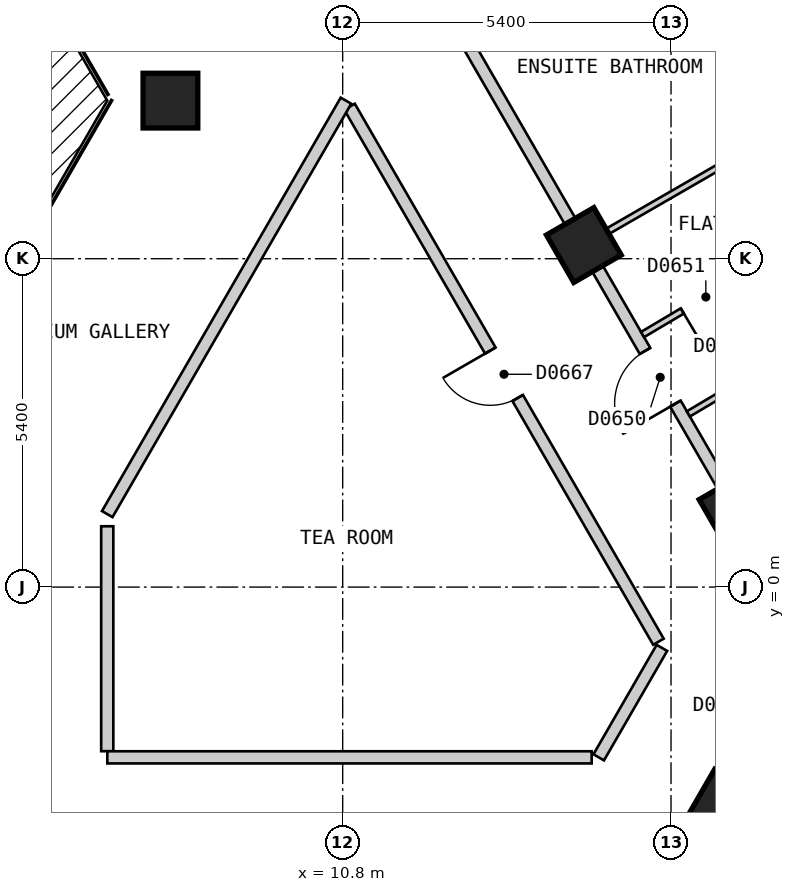
"""IFC4 building model, lengths in metres.
Left out: names, types, materials, properties, quantities, classifications, styles, units other than length and angle.
Written with IfcOpenShell. Run it as: python <this file> out.ifc"""

import sys

from ifc_helpers import new_model, si_unit, direction, frame, frame_2d, origin, origin_2d, place, context, subcontext, project, spatial, polyline, rectangle, outline, extrude, element, fill, save


model = new_model("IFC4")
c1 = context("Model", 3, precision=1e-05, world=origin(), true_north=direction((0.0, 1.0)))
c2 = subcontext(c1, "Body", "Model", "MODEL_VIEW")
j1 = project(units=[si_unit("LENGTHUNIT", "METRE"), si_unit("PLANEANGLEUNIT", "RADIAN")], contexts=[c1])
p1 = place(None, origin())
s1 = spatial("IfcSite", under=j1, at=p1, CompositionType="ELEMENT")
p2 = place(p1, origin())
s2 = spatial("IfcBuilding", under=s1, at=p2, CompositionType="ELEMENT")
p3 = place(p2, frame((0.0, 0.0, 75.0)))
s3 = spatial("IfcBuildingStorey", under=s2, at=p3, CompositionType="ELEMENT", Elevation=75.0)
for number, where, z_axis, x_axis in (
    (1, (17.083, -3.612, 0.0), (0.0, 0.0, 1.0), (0.5, 0.866, 0.0)),
    (2, (17.278, 1.274, 0.0), (0.0, 0.0, 1.0), (-0.5, 0.866, 0.0)),
    (3, (14.766, 5.625, 0.0), (0.0, 0.0, 1.0), (-0.5, 0.866, 0.0)),
    (4, (7.967, 8.0, 0.0), (0.0, 0.0, 1.0), (1.0, 0.0, 0.0)),
):
    element("IfcColumn", number, at=place(p3, frame(where, z_axis=z_axis, x_axis=x_axis)), inside=s3, PredefinedType="COLUMN", context=c2, shape_type="SweptSolid", body=[
        extrude(rectangle(XDim=0.9, YDim=0.9, at=origin_2d()), origin(), (0.0, 0.0, 1.0), 3.0),
    ])
p4 = place(p3, frame((29.027, 1.425, 0.0), z_axis=(0.0, 0.0, 1.0), x_axis=(-0.500027479704, 0.866009537788, 0.0)))
e5 = element("IfcWall", 5, at=p4, inside=s3, PredefinedType="SOLIDWALL", context=c2, shape_type="SweptSolid", body=[
    extrude(outline(polyline([(0.0, -0.15), (26.559, -0.15), (26.478, 0.15), (0.08, 0.15), (0.0, -0.15)])), origin(), (0.0, 0.0, 1.0), 2.7),
])
p5 = place(p4, frame((1.227, 0.0, 0.15)))
e6 = element("IfcOpeningElement", 6, at=p5, cuts=e5, PredefinedType="OPENING", context=c2, shape_type="SweptSolid", body=[
    extrude(rectangle(XDim=1.5, YDim=2.1, at=frame_2d((0.75, 1.05))), frame((0.0, 0.16, 0.0), z_axis=(0.0, -1.0, 0.0), x_axis=(1.0, 0.0, 0.0)), (0.0, 0.0, 1.0), 0.32),
])
p6 = place(p4, frame((3.738, 0.0, 0.15)))
e7 = element("IfcOpeningElement", 7, at=p6, cuts=e5, PredefinedType="OPENING", context=c2, shape_type="SweptSolid", body=[
    extrude(rectangle(XDim=1.5, YDim=2.1, at=frame_2d((0.75, 1.05))), frame((0.0, 0.16, 0.0), z_axis=(0.0, -1.0, 0.0), x_axis=(1.0, 0.0, 0.0)), (0.0, 0.0, 1.0), 0.32),
])
p7 = place(p4, frame((6.25, 0.0, 0.15)))
e8 = element("IfcOpeningElement", 8, at=p7, cuts=e5, PredefinedType="OPENING", context=c2, shape_type="SweptSolid", body=[
    extrude(rectangle(XDim=1.5, YDim=2.1, at=frame_2d((0.75, 1.05))), frame((0.0, 0.16, 0.0), z_axis=(0.0, -1.0, 0.0), x_axis=(1.0, 0.0, 0.0)), (0.0, 0.0, 1.0), 0.32),
])
p8 = place(p4, frame((8.761, 0.0, 0.15)))
e9 = element("IfcOpeningElement", 9, at=p8, cuts=e5, PredefinedType="OPENING", context=c2, shape_type="SweptSolid", body=[
    extrude(rectangle(XDim=1.5, YDim=2.1, at=frame_2d((0.75, 1.05))), frame((0.0, 0.16, 0.0), z_axis=(0.0, -1.0, 0.0), x_axis=(1.0, 0.0, 0.0)), (0.0, 0.0, 1.0), 0.32),
])
p9 = place(p4, frame((11.273, 0.0, 0.15)))
e10 = element("IfcOpeningElement", 10, at=p9, cuts=e5, PredefinedType="OPENING", context=c2, shape_type="SweptSolid", body=[
    extrude(rectangle(XDim=1.5, YDim=2.1, at=frame_2d((0.75, 1.05))), frame((0.0, 0.16, 0.0), z_axis=(0.0, -1.0, 0.0), x_axis=(1.0, 0.0, 0.0)), (0.0, 0.0, 1.0), 0.32),
])
p10 = place(p4, frame((13.785, 0.0, 0.15)))
e11 = element("IfcOpeningElement", 11, at=p10, cuts=e5, PredefinedType="OPENING", context=c2, shape_type="SweptSolid", body=[
    extrude(rectangle(XDim=1.5, YDim=2.1, at=frame_2d((0.75, 1.05))), frame((0.0, 0.16, 0.0), z_axis=(0.0, -1.0, 0.0), x_axis=(1.0, 0.0, 0.0)), (0.0, 0.0, 1.0), 0.32),
])
p11 = place(p4, frame((16.296, 0.0, 0.15)))
e12 = element("IfcOpeningElement", 12, at=p11, cuts=e5, PredefinedType="OPENING", context=c2, shape_type="SweptSolid", body=[
    extrude(rectangle(XDim=1.5, YDim=2.1, at=frame_2d((0.75, 1.05))), frame((0.0, 0.16, 0.0), z_axis=(0.0, -1.0, 0.0), x_axis=(1.0, 0.0, 0.0)), (0.0, 0.0, 1.0), 0.32),
])
p12 = place(p4, frame((18.807, 0.0, 0.15)))
e13 = element("IfcOpeningElement", 13, at=p12, cuts=e5, PredefinedType="OPENING", context=c2, shape_type="SweptSolid", body=[
    extrude(rectangle(XDim=1.5, YDim=2.1, at=frame_2d((0.75, 1.05))), frame((0.0, 0.16, 0.0), z_axis=(0.0, -1.0, 0.0), x_axis=(1.0, 0.0, 0.0)), (0.0, 0.0, 1.0), 0.32),
])
p13 = place(p4, frame((21.319, 0.0, 0.15)))
e14 = element("IfcOpeningElement", 14, at=p13, cuts=e5, PredefinedType="OPENING", context=c2, shape_type="SweptSolid", body=[
    extrude(rectangle(XDim=1.5, YDim=2.1, at=frame_2d((0.75, 1.05))), frame((0.0, 0.16, 0.0), z_axis=(0.0, -1.0, 0.0), x_axis=(1.0, 0.0, 0.0)), (0.0, 0.0, 1.0), 0.32),
])
p14 = place(p4, frame((23.831, 0.0, 0.15)))
e15 = element("IfcOpeningElement", 15, at=p14, cuts=e5, PredefinedType="OPENING", context=c2, shape_type="SweptSolid", body=[
    extrude(rectangle(XDim=1.5, YDim=2.1, at=frame_2d((0.75, 1.05))), frame((0.0, 0.16, 0.0), z_axis=(0.0, -1.0, 0.0), x_axis=(1.0, 0.0, 0.0)), (0.0, 0.0, 1.0), 0.32),
])
p15 = place(p3, frame((10.913, 7.899, 0.0), z_axis=(0.0, 0.0, 1.0), x_axis=(0.500028940566, -0.866008694296, 0.0)))
e16 = element("IfcWall", 16, at=p15, inside=s3, PredefinedType="PARTITIONING", context=c2, shape_type="SweptSolid", body=[
    extrude(rectangle(XDim=10.159, YDim=0.2, at=frame_2d((5.08, 0.0))), origin(), (0.0, 0.0, 1.0), 2.7),
])
p16 = place(p15, frame((4.63, 0.0, 0.0)))
e17 = element("IfcOpeningElement", 17, at=p16, cuts=e16, PredefinedType="OPENING", context=c2, shape_type="SweptSolid", body=[
    extrude(rectangle(XDim=0.9, YDim=2.1, at=frame_2d((0.45, 1.05))), frame((0.0, 0.11, 0.0), z_axis=(0.0, -1.0, 0.0), x_axis=(1.0, 0.0, 0.0)), (0.0, 0.0, 1.0), 0.22),
])
p17 = place(p3, frame((8.488, 16.5, 0.0), z_axis=(0.0, 0.0, 1.0), x_axis=(0.499986836607, -0.86603300354, 0.0)))
e18 = element("IfcWall", 18, at=p17, inside=s3, PredefinedType="PARTITIONING", context=c2, shape_type="SweptSolid", body=[
    extrude(rectangle(XDim=20.09, YDim=0.2, at=frame_2d((10.045, 0.0))), origin(), (0.0, 0.0, 1.0), 2.7),
])
p18 = place(p17, frame((14.569, 0.0, 0.0)))
e19 = element("IfcOpeningElement", 19, at=p18, cuts=e18, PredefinedType="OPENING", context=c2, shape_type="SweptSolid", body=[
    extrude(rectangle(XDim=1.0, YDim=2.1, at=frame_2d((0.5, 1.05))), frame((0.0, 0.11, 0.0), z_axis=(0.0, -1.0, 0.0), x_axis=(1.0, 0.0, 0.0)), (0.0, 0.0, 1.0), 0.22),
])
p19 = place(p3, frame((6.928, 1.0, 0.0), z_axis=(0.0, 0.0, 1.0), x_axis=(0.0, -1.0, 0.0)))
e20 = element("IfcWall", 20, at=p19, inside=s3, PredefinedType="PARTITIONING", context=c2, shape_type="SweptSolid", body=[
    extrude(rectangle(XDim=3.699, YDim=0.2, at=frame_2d((1.85, 0.0))), origin(), (0.0, 0.0, 1.0), 2.7),
])
p20 = place(p3, frame((6.929, -2.8, 0.0), z_axis=(0.0, 0.0, 1.0), x_axis=(1.0, 0.0, 0.0)))
e21 = element("IfcWall", 21, at=p20, inside=s3, PredefinedType="PARTITIONING", context=c2, shape_type="SweptSolid", body=[
    extrude(rectangle(XDim=7.966, YDim=0.2, at=frame_2d((3.983, 0.0))), origin(), (0.0, 0.0, 1.0), 2.7),
])
p21 = place(p3, frame((6.928, 1.2, 0.0), z_axis=(0.0, 0.0, 1.0), x_axis=(0.500055327065, 0.865993458332, 0.0)))
e22 = element("IfcWall", 22, at=p21, inside=s3, PredefinedType="PARTITIONING", context=c2, shape_type="SweptSolid", body=[
    extrude(rectangle(XDim=7.851, YDim=0.2, at=frame_2d((3.926, 0.0))), origin(), (0.0, 0.0, 1.0), 2.7),
])
p22 = place(p3, frame((15.011, -2.8, 0.0), z_axis=(0.0, 0.0, 1.0), x_axis=(0.499929208183, 0.866066271601, 0.0)))
e23 = element("IfcWall", 23, at=p22, inside=s3, PredefinedType="PARTITIONING", context=c2, shape_type="SweptSolid", body=[
    extrude(rectangle(XDim=2.078, YDim=0.2, at=frame_2d((1.039, 0.0))), origin(), (0.0, 0.0, 1.0), 2.7),
])
p23 = place(p3, frame((15.771, -5.884, 0.0), z_axis=(0.0, 0.0, 1.0), x_axis=(0.499939494019, 0.866060334111, 0.0)))
e24 = element("IfcWall", 24, at=p23, inside=s3, PredefinedType="PARTITIONING", context=c2, shape_type="SweptSolid", body=[
    extrude(rectangle(XDim=5.583, YDim=0.2, at=frame_2d((2.792, 0.0))), origin(), (0.0, 0.0, 1.0), 2.7),
])
p24 = place(p23, frame((4.03, 0.0, 0.0)))
e25 = element("IfcOpeningElement", 25, at=p24, cuts=e24, PredefinedType="OPENING", context=c2, shape_type="SweptSolid", body=[
    extrude(rectangle(XDim=1.0, YDim=2.1, at=frame_2d((0.5, 1.05))), frame((0.0, 0.11, 0.0), z_axis=(0.0, -1.0, 0.0), x_axis=(1.0, 0.0, 0.0)), (0.0, 0.0, 1.0), 0.22),
])
p25 = place(p3, frame((14.853, 5.675, 0.0), z_axis=(0.0, 0.0, 1.0), x_axis=(0.866016855193, 0.500014806302, 0.0)))
e26 = element("IfcWall", 26, at=p25, inside=s3, PredefinedType="PARTITIONING", context=c2, shape_type="SweptSolid", body=[
    extrude(rectangle(XDim=10.0, YDim=0.1, at=frame_2d((5.0, 0.0))), origin(), (0.0, 0.0, 1.0), 2.7),
])
p26 = place(p25, frame((4.775, 0.0, 0.0)))
e27 = element("IfcOpeningElement", 27, at=p26, cuts=e26, PredefinedType="OPENING", context=c2, shape_type="SweptSolid", body=[
    extrude(rectangle(XDim=0.9, YDim=2.1, at=frame_2d((0.45, 1.05))), frame((0.0, 0.06, 0.0), z_axis=(0.0, -1.0, 0.0), x_axis=(1.0, 0.0, 0.0)), (0.0, 0.0, 1.0), 0.12),
])
p27 = place(p3, frame((15.732, 4.153, 0.0), z_axis=(0.0, 0.0, 1.0), x_axis=(0.859987631152, 0.510314877566, 0.0)))
e28 = element("IfcWall", 28, at=p27, inside=s3, PredefinedType="PARTITIONING", context=c2, shape_type="SweptSolid", body=[
    extrude(rectangle(XDim=2.52, YDim=0.1, at=frame_2d((1.26, 0.0))), origin(), (0.0, 0.0, 1.0), 2.7),
])
p28 = place(p27, frame((0.76, 0.0, 0.0)))
e29 = element("IfcOpeningElement", 29, at=p28, cuts=e28, PredefinedType="OPENING", context=c2, shape_type="SweptSolid", body=[
    extrude(rectangle(XDim=0.9, YDim=2.1, at=frame_2d((0.45, 1.05))), frame((0.0, 0.06, 0.0), z_axis=(0.0, -1.0, 0.0), x_axis=(1.0, 0.0, 0.0)), (0.0, 0.0, 1.0), 0.12),
])
p29 = place(p3, frame((16.485, 2.848, 0.0), z_axis=(0.0, 0.0, 1.0), x_axis=(0.860052465539, 0.510205602205, 0.0)))
e30 = element("IfcWall", 30, at=p29, inside=s3, PredefinedType="PARTITIONING", context=c2, shape_type="SweptSolid", body=[
    extrude(rectangle(XDim=2.489, YDim=0.1, at=frame_2d((1.245, 0.0))), origin(), (0.0, 0.0, 1.0), 2.7),
])
p30 = place(p29, frame((0.819, 0.0, 0.0)))
e31 = element("IfcOpeningElement", 31, at=p30, cuts=e30, PredefinedType="OPENING", context=c2, shape_type="SweptSolid", body=[
    extrude(rectangle(XDim=0.8, YDim=2.1, at=frame_2d((0.4, 1.05))), frame((0.0, 0.06, 0.0), z_axis=(0.0, -1.0, 0.0), x_axis=(1.0, 0.0, 0.0)), (0.0, 0.0, 1.0), 0.12),
])
p31 = place(p3, frame((15.372, 11.775, 0.0), z_axis=(0.0, 0.0, 1.0), x_axis=(0.500035488351, -0.866004913606, 0.0)))
e32 = element("IfcWall", 32, at=p31, inside=s3, PredefinedType="PARTITIONING", context=c2, shape_type="SweptSolid", body=[
    extrude(rectangle(XDim=4.973, YDim=0.1, at=frame_2d((2.487, 0.0))), origin(), (0.0, 0.0, 1.0), 2.7),
])
p32 = place(p31, frame((2.112, 0.0, 0.0)))
e33 = element("IfcOpeningElement", 33, at=p32, cuts=e32, PredefinedType="OPENING", context=c2, shape_type="SweptSolid", body=[
    extrude(rectangle(XDim=0.8, YDim=2.1, at=frame_2d((0.4, 1.05))), frame((0.0, 0.06, 0.0), z_axis=(0.0, -1.0, 0.0), x_axis=(1.0, 0.0, 0.0)), (0.0, 0.0, 1.0), 0.12),
])
p33 = place(p18, origin())
e34 = element("IfcDoor", 34, at=p33, inside=s3, OperationType="SINGLE_SWING_RIGHT", PredefinedType="DOOR", context=c2, shape_type="SweptSolid", body=[
    extrude(rectangle(XDim=1.0, YDim=2.1, at=frame_2d((0.5, 1.05))), frame((0.0, 0.025, 0.0), z_axis=(0.0, -1.0, 0.0), x_axis=(1.0, 0.0, 0.0)), (0.0, 0.0, 1.0), 0.05),
])
fill(e19, e34)
p34 = place(p28, origin())
e35 = element("IfcDoor", 35, at=p34, inside=s3, OperationType="SINGLE_SWING_LEFT", PredefinedType="DOOR", context=c2, shape_type="SweptSolid", body=[
    extrude(rectangle(XDim=0.9, YDim=2.1, at=frame_2d((0.45, 1.05))), frame((0.0, 0.025, 0.0), z_axis=(0.0, -1.0, 0.0), x_axis=(1.0, 0.0, 0.0)), (0.0, 0.0, 1.0), 0.05),
])
fill(e29, e35)
p35 = place(p16, origin())
e36 = element("IfcDoor", 36, at=p35, inside=s3, OperationType="SINGLE_SWING_LEFT", PredefinedType="DOOR", context=c2, shape_type="SweptSolid", body=[
    extrude(rectangle(XDim=0.9, YDim=2.1, at=frame_2d((0.45, 1.05))), frame((0.0, 0.025, 0.0), z_axis=(0.0, -1.0, 0.0), x_axis=(1.0, 0.0, 0.0)), (0.0, 0.0, 1.0), 0.05),
])
fill(e17, e36)
save(model, sys.argv[1])
